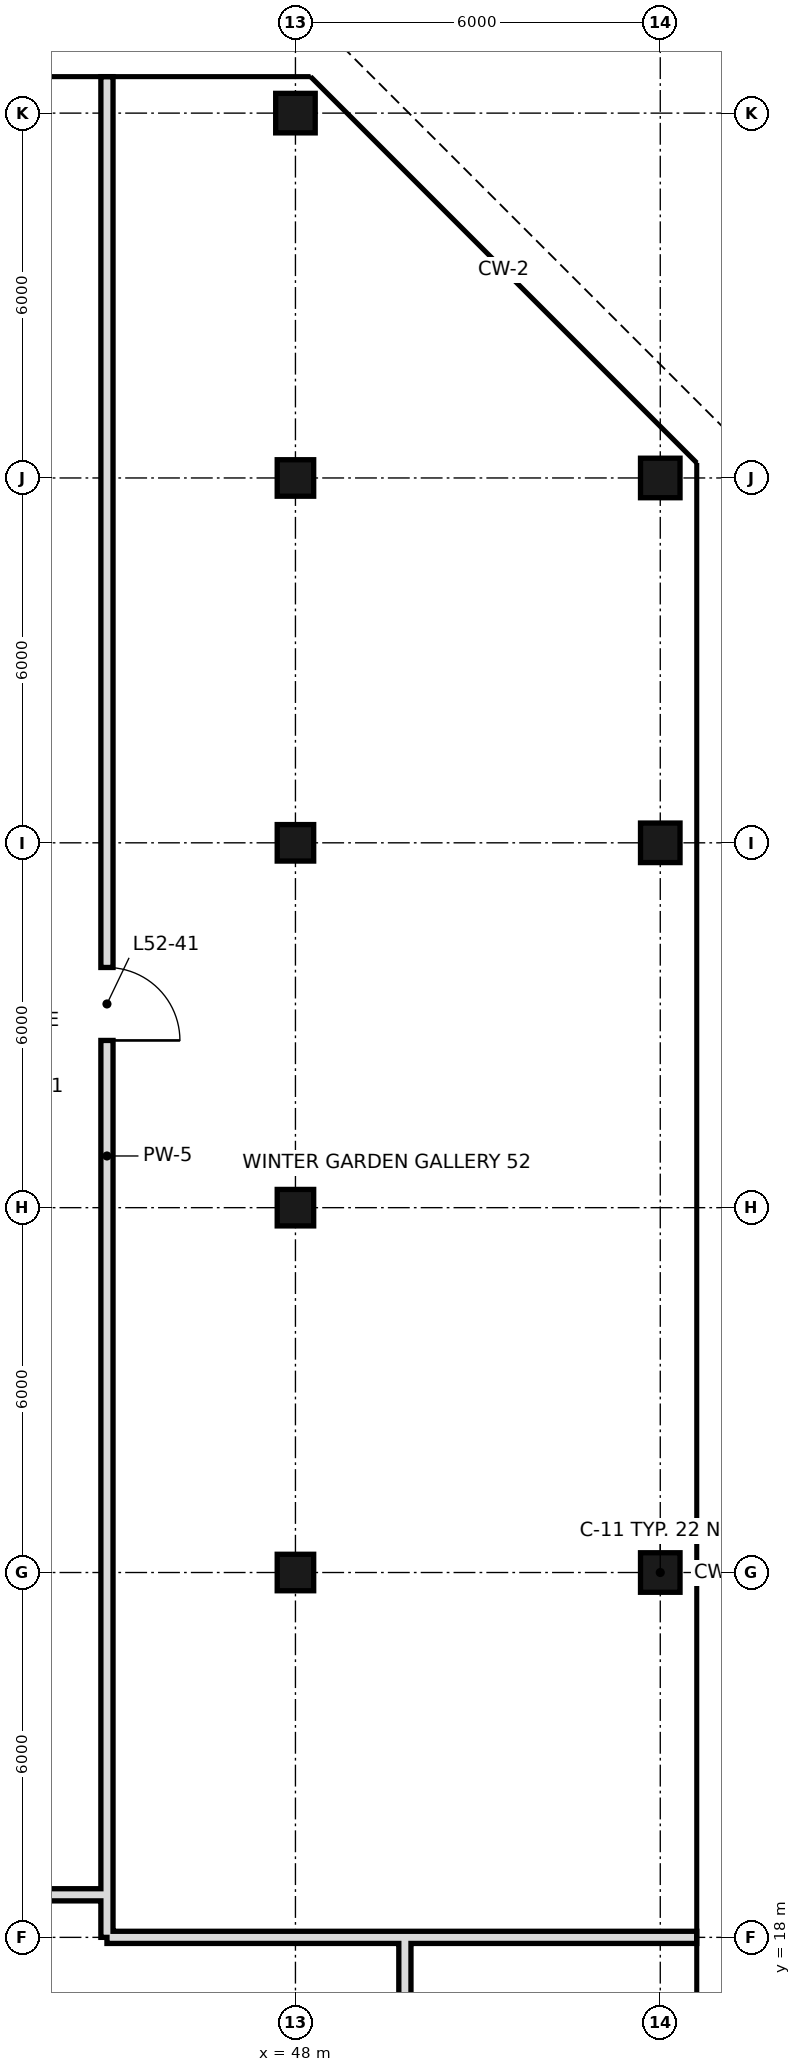
"""IFC4 building model, lengths in metres.
Left out: names, types, materials, properties, quantities, classifications, styles, units other than length and angle.
Written with IfcOpenShell. Run it as: python <this file> out.ifc"""

import sys

from ifc_helpers import new_model, si_unit, direction, frame, frame_2d, origin, origin_2d, place, context, subcontext, project, spatial, rectangle, hollow_rectangle, extrude, element, fill, save


model = new_model("IFC4")
c1 = context("Model", 3, precision=1e-05, world=origin(), true_north=direction((0.0, 1.0)))
c2 = subcontext(c1, "Body", "Model", "MODEL_VIEW")
j1 = project(units=[si_unit("LENGTHUNIT", "METRE"), si_unit("PLANEANGLEUNIT", "RADIAN")], contexts=[c1])
p1 = place(None, origin())
s1 = spatial("IfcSite", under=j1, at=p1, CompositionType="ELEMENT")
p2 = place(p1, origin())
s2 = spatial("IfcBuilding", under=s1, at=p2, CompositionType="ELEMENT")
p3 = place(p2, frame((0.0, 0.0, 222.6)))
s3 = spatial("IfcBuildingStorey", under=s2, at=p3, CompositionType="ELEMENT", Elevation=222.6)
for number, where, z_axis, x_axis in (
    (1, (48.0, 24.0, 0.0), (0.0, 0.0, 1.0), (1.0, 0.0, 0.0)),
    (2, (48.0, 30.0, 0.0), (0.0, 0.0, 1.0), (1.0, 0.0, 0.0)),
    (3, (48.0, 36.0, 0.0), (0.0, 0.0, 1.0), (1.0, 0.0, 0.0)),
    (4, (48.0, 42.0, 0.0), (0.0, 0.0, 1.0), (1.0, 0.0, 0.0)),
):
    element("IfcColumn", number, at=place(p3, frame(where, z_axis=z_axis, x_axis=x_axis)), inside=s3, PredefinedType="COLUMN", context=c2, shape_type="SweptSolid", body=[
        extrude(hollow_rectangle(XDim=0.6, YDim=0.6, WallThickness=0.028, at=origin_2d()), origin(), (0.0, 0.0, 1.0), 3.6),
    ])
for number, where, z_axis, x_axis in (
    (5, (48.0, 48.0, 0.0), (0.0, 0.0, 1.0), (1.0, 0.0, 0.0)),
    (6, (54.0, 24.0, 0.0), (0.0, 0.0, 1.0), (1.0, 0.0, 0.0)),
    (7, (54.0, 36.0, 0.0), (0.0, 0.0, 1.0), (1.0, 0.0, 0.0)),
    (8, (54.0, 42.0, 0.0), (0.0, 0.0, 1.0), (1.0, 0.0, 0.0)),
):
    element("IfcColumn", number, at=place(p3, frame(where, z_axis=z_axis, x_axis=x_axis)), inside=s3, PredefinedType="COLUMN", context=c2, shape_type="SweptSolid", body=[
        extrude(hollow_rectangle(XDim=0.65, YDim=0.65, WallThickness=0.032, at=origin_2d()), origin(), (0.0, 0.0, 1.0), 3.6),
    ])
p4 = place(p3, frame((44.9, 18.0, 0.0), z_axis=(0.0, 0.0, 1.0), x_axis=(0.0, 1.0, 0.0)))
e9 = element("IfcWall", 9, at=p4, inside=s3, PredefinedType="SOLIDWALL", context=c2, shape_type="SweptSolid", body=[
    extrude(rectangle(XDim=30.6, YDim=0.2, at=frame_2d((15.3, 0.0))), origin(), (0.0, 0.0, 1.0), 2.72),
])
p5 = place(p4, frame((14.75, 0.0, 0.0)))
e10 = element("IfcOpeningElement", 10, at=p5, cuts=e9, PredefinedType="OPENING", context=c2, shape_type="SweptSolid", body=[
    extrude(rectangle(XDim=1.2, YDim=2.4, at=frame_2d((0.6, 1.2))), frame((0.0, 0.11, 0.0), z_axis=(0.0, -1.0, 0.0), x_axis=(1.0, 0.0, 0.0)), (0.0, 0.0, 1.0), 0.22),
])
p6 = place(p3, frame((49.8, 10.8, 0.0), z_axis=(0.0, 0.0, 1.0), x_axis=(0.0, 1.0, 0.0)))
e11 = element("IfcWall", 11, at=p6, inside=s3, PredefinedType="SOLIDWALL", context=c2, shape_type="SweptSolid", body=[
    extrude(rectangle(XDim=7.2, YDim=0.2, at=frame_2d((3.6, 0.0))), origin(), (0.0, 0.0, 1.0), 2.97),
])
p7 = place(p3, frame((44.9, 18.0, 0.0), z_axis=(0.0, 0.0, 1.0), x_axis=(1.0, 0.0, 0.0)))
e12 = element("IfcWall", 12, at=p7, inside=s3, PredefinedType="SOLIDWALL", context=c2, shape_type="SweptSolid", body=[
    extrude(rectangle(XDim=4.9, YDim=0.2, at=frame_2d((2.45, 0.0))), origin(), (0.0, 0.0, 1.0), 2.72),
])
p8 = place(p3, frame((49.8, 18.0, 0.0), z_axis=(0.0, 0.0, 1.0), x_axis=(1.0, 0.0, 0.0)))
e13 = element("IfcWall", 13, at=p8, inside=s3, PredefinedType="SOLIDWALL", context=c2, shape_type="SweptSolid", body=[
    extrude(rectangle(XDim=4.8, YDim=0.2, at=frame_2d((2.4, 0.0))), origin(), (0.0, 0.0, 1.0), 2.72),
])
p9 = place(p3, frame((7.2, 18.7, 0.0), z_axis=(0.0, 0.0, 1.0), x_axis=(1.0, 0.0, 0.0)))
e14 = element("IfcWall", 14, at=p9, inside=s3, PredefinedType="SOLIDWALL", context=c2, shape_type="SweptSolid", body=[
    extrude(rectangle(XDim=37.7, YDim=0.2, at=frame_2d((18.85, 0.0))), origin(), (0.0, 0.0, 1.0), 2.72),
])
p10 = place(p9, frame((1.54, 0.0, 0.0)))
e15 = element("IfcOpeningElement", 15, at=p10, cuts=e14, PredefinedType="OPENING", context=c2, shape_type="SweptSolid", body=[
    extrude(rectangle(XDim=1.2, YDim=2.4, at=frame_2d((0.6, 1.2))), frame((0.0, 0.11, 0.0), z_axis=(0.0, -1.0, 0.0), x_axis=(1.0, 0.0, 0.0)), (0.0, 0.0, 1.0), 0.22),
])
p11 = place(p9, frame((30.26, 0.0, 0.0)))
e16 = element("IfcOpeningElement", 16, at=p11, cuts=e14, PredefinedType="OPENING", context=c2, shape_type="SweptSolid", body=[
    extrude(rectangle(XDim=1.2, YDim=2.4, at=frame_2d((0.6, 1.2))), frame((0.0, 0.11, 0.0), z_axis=(0.0, -1.0, 0.0), x_axis=(1.0, 0.0, 0.0)), (0.0, 0.0, 1.0), 0.22),
])
p12 = place(p5, frame((1.2, 0.0, 0.0), z_axis=(0.0, 0.0, 1.0), x_axis=(-1.0, 0.0, 0.0)))
e17 = element("IfcDoor", 17, at=p12, inside=s3, OperationType="SINGLE_SWING_RIGHT", PredefinedType="DOOR", context=c2, shape_type="SweptSolid", body=[
    extrude(rectangle(XDim=1.2, YDim=2.4, at=frame_2d((0.6, 1.2))), frame((0.0, 0.025, 0.0), z_axis=(0.0, -1.0, 0.0), x_axis=(1.0, 0.0, 0.0)), (0.0, 0.0, 1.0), 0.05),
])
fill(e10, e17)
save(model, sys.argv[1])
